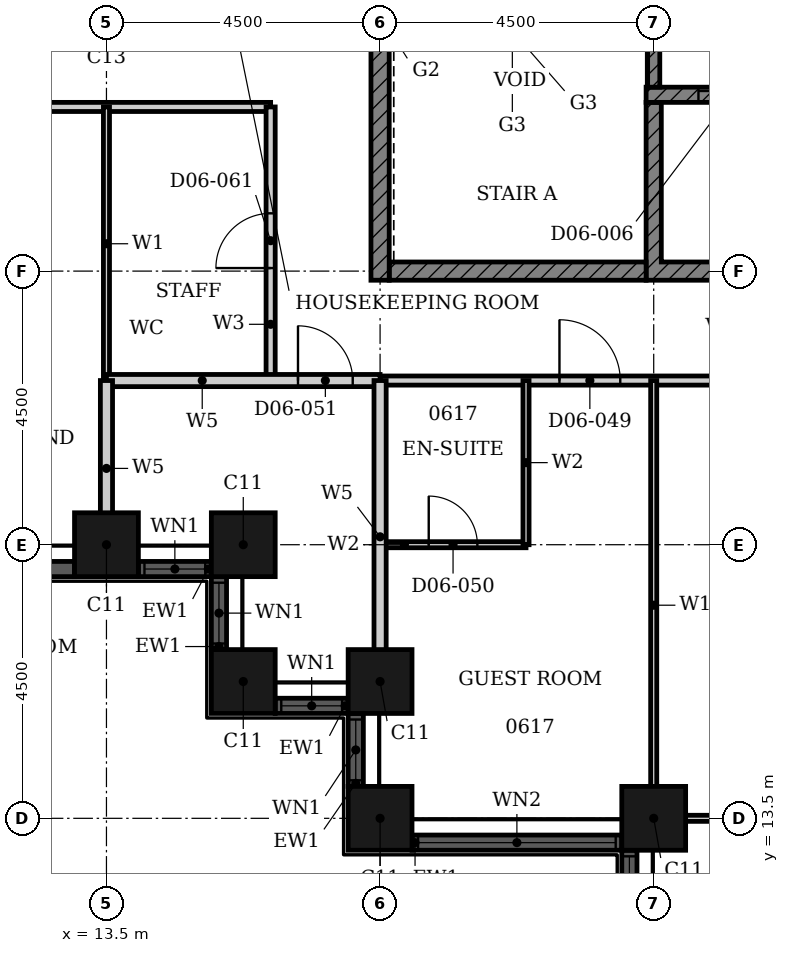
"""IFC4 building model, lengths in metres.
Left out: names, types, materials, properties, quantities, classifications, styles, units other than length and angle.
Written with IfcOpenShell. Run it as: python <this file> out.ifc"""

import sys

from ifc_helpers import new_model, si_unit, direction, frame, frame_2d, origin, origin_2d, place, context, subcontext, project, spatial, polyline, rectangle, hollow_rectangle, outline, extrude, element, fill, save


model = new_model("IFC4")
c1 = context("Model", 3, precision=1e-05, world=origin(), true_north=direction((0.0, 1.0)))
c2 = subcontext(c1, "Body", "Model", "MODEL_VIEW")
j1 = project(units=[si_unit("LENGTHUNIT", "METRE"), si_unit("PLANEANGLEUNIT", "RADIAN")], contexts=[c1])
p1 = place(None, origin())
s1 = spatial("IfcSite", under=j1, at=p1, CompositionType="ELEMENT")
p2 = place(p1, origin())
s2 = spatial("IfcBuilding", under=s1, at=p2, CompositionType="ELEMENT")
p3 = place(p2, frame((0.0, 0.0, 33.6)))
s3 = spatial("IfcBuildingStorey", under=s2, at=p3, CompositionType="ELEMENT", Elevation=33.6)
for number, where, z_axis, x_axis in (
    (1, (13.5, 18.0, 0.0), (0.0, 0.0, 1.0), (1.0, 0.0, 0.0)),
    (2, (15.75, 18.0, 0.0), (0.0, 0.0, 1.0), (1.0, 0.0, 0.0)),
    (3, (15.75, 15.75, 0.0), (0.0, 0.0, 1.0), (1.0, 0.0, 0.0)),
    (4, (18.0, 15.75, 0.0), (0.0, 0.0, 1.0), (1.0, 0.0, 0.0)),
    (5, (18.0, 13.5, 0.0), (0.0, 0.0, 1.0), (1.0, 0.0, 0.0)),
    (6, (22.5, 13.5, 0.0), (0.0, 0.0, 1.0), (1.0, 0.0, 0.0)),
):
    element("IfcColumn", number, at=place(p3, frame(where, z_axis=z_axis, x_axis=x_axis)), inside=s3, PredefinedType="COLUMN", context=c2, shape_type="SweptSolid", body=[
        extrude(hollow_rectangle(XDim=1.05, YDim=1.05, WallThickness=0.034, at=origin_2d()), origin(), (0.0, 0.0, 1.0), 3.6),
    ])
p4 = place(p3, frame((5.025, 17.6, 0.0), z_axis=(0.0, 0.0, 1.0), x_axis=(1.0, 0.0, 0.0)))
e7 = element("IfcWall", 7, at=p4, inside=s3, PredefinedType="SOLIDWALL", context=c2, shape_type="SweptSolid", body=[
    extrude(rectangle(XDim=7.95, YDim=0.25, at=frame_2d((3.975, 0.0))), origin(), (0.0, 0.0, 1.0), 3.6),
])
p5 = place(p4, frame((0.1, 0.0, 0.9)))
e8 = element("IfcOpeningElement", 8, at=p5, cuts=e7, PredefinedType="OPENING", context=c2, shape_type="SweptSolid", body=[
    extrude(rectangle(XDim=3.25, YDim=2.08, at=frame_2d((1.625, 1.04))), frame((0.0, 0.135, 0.0), z_axis=(0.0, -1.0, 0.0), x_axis=(1.0, 0.0, 0.0)), (0.0, 0.0, 1.0), 0.27),
])
p6 = place(p4, frame((5.325, 0.0, 0.0)))
e9 = element("IfcOpeningElement", 9, at=p6, cuts=e7, PredefinedType="OPENING", context=c2, shape_type="SweptSolid", body=[
    extrude(rectangle(XDim=1.8, YDim=2.4, at=frame_2d((0.9, 1.2))), frame((0.0, 0.135, 0.0), z_axis=(0.0, -1.0, 0.0), x_axis=(1.0, 0.0, 0.0)), (0.0, 0.0, 1.0), 0.27),
])
p7 = place(p3, frame((14.025, 17.6, 0.0), z_axis=(0.0, 0.0, 1.0), x_axis=(1.0, 0.0, 0.0)))
e10 = element("IfcWall", 10, at=p7, inside=s3, PredefinedType="SOLIDWALL", context=c2, shape_type="SweptSolid", body=[
    extrude(rectangle(XDim=1.2, YDim=0.25, at=frame_2d((0.6, 0.0))), origin(), (0.0, 0.0, 1.0), 3.6),
])
p8 = place(p7, frame((0.1, 0.0, 0.9)))
e11 = element("IfcOpeningElement", 11, at=p8, cuts=e10, PredefinedType="OPENING", context=c2, shape_type="SweptSolid", body=[
    extrude(rectangle(XDim=1.0, YDim=2.08, at=frame_2d((0.5, 1.04))), frame((0.0, 0.135, 0.0), z_axis=(0.0, -1.0, 0.0), x_axis=(1.0, 0.0, 0.0)), (0.0, 0.0, 1.0), 0.27),
])
p9 = place(p3, frame((15.35, 17.475, 0.0), z_axis=(0.0, 0.0, 1.0), x_axis=(0.0, -1.0, 0.0)))
e12 = element("IfcWall", 12, at=p9, inside=s3, PredefinedType="SOLIDWALL", context=c2, shape_type="SweptSolid", body=[
    extrude(rectangle(XDim=1.2, YDim=0.25, at=frame_2d((0.6, 0.0))), origin(), (0.0, 0.0, 1.0), 3.6),
])
p10 = place(p9, frame((0.1, 0.0, 0.9)))
e13 = element("IfcOpeningElement", 13, at=p10, cuts=e12, PredefinedType="OPENING", context=c2, shape_type="SweptSolid", body=[
    extrude(rectangle(XDim=1.0, YDim=2.08, at=frame_2d((0.5, 1.04))), frame((0.0, 0.135, 0.0), z_axis=(0.0, -1.0, 0.0), x_axis=(1.0, 0.0, 0.0)), (0.0, 0.0, 1.0), 0.27),
])
p11 = place(p3, frame((16.275, 15.35, 0.0), z_axis=(0.0, 0.0, 1.0), x_axis=(1.0, 0.0, 0.0)))
e14 = element("IfcWall", 14, at=p11, inside=s3, PredefinedType="SOLIDWALL", context=c2, shape_type="SweptSolid", body=[
    extrude(rectangle(XDim=1.2, YDim=0.25, at=frame_2d((0.6, 0.0))), origin(), (0.0, 0.0, 1.0), 3.6),
])
p12 = place(p11, frame((0.1, 0.0, 0.9)))
e15 = element("IfcOpeningElement", 15, at=p12, cuts=e14, PredefinedType="OPENING", context=c2, shape_type="SweptSolid", body=[
    extrude(rectangle(XDim=1.0, YDim=2.08, at=frame_2d((0.5, 1.04))), frame((0.0, 0.135, 0.0), z_axis=(0.0, -1.0, 0.0), x_axis=(1.0, 0.0, 0.0)), (0.0, 0.0, 1.0), 0.27),
])
p13 = place(p3, frame((17.6, 15.225, 0.0), z_axis=(0.0, 0.0, 1.0), x_axis=(0.0, -1.0, 0.0)))
e16 = element("IfcWall", 16, at=p13, inside=s3, PredefinedType="SOLIDWALL", context=c2, shape_type="SweptSolid", body=[
    extrude(rectangle(XDim=1.2, YDim=0.25, at=frame_2d((0.6, 0.0))), origin(), (0.0, 0.0, 1.0), 3.6),
])
p14 = place(p13, frame((0.1, 0.0, 0.9)))
e17 = element("IfcOpeningElement", 17, at=p14, cuts=e16, PredefinedType="OPENING", context=c2, shape_type="SweptSolid", body=[
    extrude(rectangle(XDim=1.0, YDim=2.08, at=frame_2d((0.5, 1.04))), frame((0.0, 0.135, 0.0), z_axis=(0.0, -1.0, 0.0), x_axis=(1.0, 0.0, 0.0)), (0.0, 0.0, 1.0), 0.27),
])
p15 = place(p3, frame((18.525, 13.1, 0.0), z_axis=(0.0, 0.0, 1.0), x_axis=(1.0, 0.0, 0.0)))
e18 = element("IfcWall", 18, at=p15, inside=s3, PredefinedType="SOLIDWALL", context=c2, shape_type="SweptSolid", body=[
    extrude(rectangle(XDim=3.45, YDim=0.25, at=frame_2d((1.725, 0.0))), origin(), (0.0, 0.0, 1.0), 3.6),
])
p16 = place(p15, frame((0.1, 0.0, 0.9)))
e19 = element("IfcOpeningElement", 19, at=p16, cuts=e18, PredefinedType="OPENING", context=c2, shape_type="SweptSolid", body=[
    extrude(rectangle(XDim=3.25, YDim=2.08, at=frame_2d((1.625, 1.04))), frame((0.0, 0.135, 0.0), z_axis=(0.0, -1.0, 0.0), x_axis=(1.0, 0.0, 0.0)), (0.0, 0.0, 1.0), 0.27),
])
p17 = place(p3, frame((22.1, 12.975, 0.0), z_axis=(0.0, 0.0, 1.0), x_axis=(0.0, -1.0, 0.0)))
e20 = element("IfcWall", 20, at=p17, inside=s3, PredefinedType="SOLIDWALL", context=c2, shape_type="SweptSolid", body=[
    extrude(rectangle(XDim=7.95, YDim=0.25, at=frame_2d((3.975, 0.0))), origin(), (0.0, 0.0, 1.0), 3.6),
])
p18 = place(p17, frame((0.1, 0.0, 0.9)))
e21 = element("IfcOpeningElement", 21, at=p18, cuts=e20, PredefinedType="OPENING", context=c2, shape_type="SweptSolid", body=[
    extrude(rectangle(XDim=3.25, YDim=2.08, at=frame_2d((1.625, 1.04))), frame((0.0, 0.135, 0.0), z_axis=(0.0, -1.0, 0.0), x_axis=(1.0, 0.0, 0.0)), (0.0, 0.0, 1.0), 0.27),
])
p19 = place(p17, frame((5.325, 0.0, 0.0)))
e22 = element("IfcOpeningElement", 22, at=p19, cuts=e20, PredefinedType="OPENING", context=c2, shape_type="SweptSolid", body=[
    extrude(rectangle(XDim=1.8, YDim=2.4, at=frame_2d((0.9, 1.2))), frame((0.0, 0.135, 0.0), z_axis=(0.0, -1.0, 0.0), x_axis=(1.0, 0.0, 0.0)), (0.0, 0.0, 1.0), 0.27),
])
p20 = place(p3, origin())
e23 = element("IfcWall", 23, at=p20, inside=s3, PredefinedType="SHEAR", context=c2, shape_type="SweptSolid", body=[
    extrude(outline(polyline([(22.375, 22.35), (38.053, 22.35), (38.053, 25.275), (37.803, 25.275), (37.803, 22.65), (35.482, 22.65), (35.482, 25.275), (35.232, 25.275), (35.232, 22.65), (32.911, 22.65), (32.911, 25.275), (32.661, 25.275), (32.661, 22.65), (30.339, 22.65), (30.339, 25.275), (30.089, 25.275), (30.089, 22.65), (27.768, 22.65), (27.768, 25.275), (27.518, 25.275), (27.518, 22.65), (25.197, 22.65), (25.197, 25.275), (24.947, 25.275), (24.947, 22.65), (22.625, 22.65), (22.625, 25.275), (22.375, 25.275), (22.375, 22.35)])), origin(), (0.0, 0.0, 1.0), 3.3),
])
p21 = place(p3, frame((18.15, 22.5, 0.0), z_axis=(0.0, 0.0, 1.0), x_axis=(1.0, 0.0, 0.0)))
e24 = element("IfcWall", 24, at=p21, inside=s3, PredefinedType="SHEAR", context=c2, shape_type="SweptSolid", body=[
    extrude(rectangle(XDim=4.225, YDim=0.3, at=frame_2d((2.113, 0.0))), origin(), (0.0, 0.0, 1.0), 3.3),
])
p22 = place(p3, frame((18.0, 22.35, 0.0), z_axis=(0.0, 0.0, 1.0), x_axis=(0.0, 1.0, 0.0)))
e25 = element("IfcWall", 25, at=p22, inside=s3, PredefinedType="SHEAR", context=c2, shape_type="SweptSolid", body=[
    extrude(rectangle(XDim=9.3, YDim=0.3, at=frame_2d((4.65, 0.0))), origin(), (0.0, 0.0, 1.0), 3.3),
])
p23 = place(p3, frame((22.375, 25.4, 0.0), z_axis=(0.0, 0.0, 1.0), x_axis=(1.0, 0.0, 0.0)))
e26 = element("IfcWall", 26, at=p23, inside=s3, PredefinedType="SHEAR", context=c2, shape_type="SweptSolid", body=[
    extrude(rectangle(XDim=15.678, YDim=0.25, at=frame_2d((7.839, 0.0))), origin(), (0.0, 0.0, 1.0), 3.3),
])
p24 = place(p23, frame((3.432, 0.0, 0.0)))
e27 = element("IfcOpeningElement", 27, at=p24, cuts=e26, PredefinedType="OPENING", context=c2, shape_type="SweptSolid", body=[
    extrude(rectangle(XDim=1.1, YDim=2.1, at=frame_2d((0.55, 1.05))), frame((0.0, 0.135, 0.0), z_axis=(0.0, -1.0, 0.0), x_axis=(1.0, 0.0, 0.0)), (0.0, 0.0, 1.0), 0.27),
])
p25 = place(p23, frame((11.146, 0.0, 0.0)))
e28 = element("IfcOpeningElement", 28, at=p25, cuts=e26, PredefinedType="OPENING", context=c2, shape_type="SweptSolid", body=[
    extrude(rectangle(XDim=1.1, YDim=2.1, at=frame_2d((0.55, 1.05))), frame((0.0, 0.135, 0.0), z_axis=(0.0, -1.0, 0.0), x_axis=(1.0, 0.0, 0.0)), (0.0, 0.0, 1.0), 0.27),
])
p26 = place(p23, frame((13.718, 0.0, 0.0)))
e29 = element("IfcOpeningElement", 29, at=p26, cuts=e26, PredefinedType="OPENING", context=c2, shape_type="SweptSolid", body=[
    extrude(rectangle(XDim=1.1, YDim=2.1, at=frame_2d((0.55, 1.05))), frame((0.0, 0.135, 0.0), z_axis=(0.0, -1.0, 0.0), x_axis=(1.0, 0.0, 0.0)), (0.0, 0.0, 1.0), 0.27),
])
p27 = place(p23, frame((0.861, 0.0, 0.0)))
e30 = element("IfcOpeningElement", 30, at=p27, cuts=e26, PredefinedType="OPENING", context=c2, shape_type="SweptSolid", body=[
    extrude(rectangle(XDim=1.1, YDim=2.1, at=frame_2d((0.55, 1.05))), frame((0.0, 0.135, 0.0), z_axis=(0.0, -1.0, 0.0), x_axis=(1.0, 0.0, 0.0)), (0.0, 0.0, 1.0), 0.27),
])
p28 = place(p3, frame((22.5, 31.35, 0.0), z_axis=(0.0, 0.0, 1.0), x_axis=(0.0, -1.0, 0.0)))
e31 = element("IfcWall", 31, at=p28, inside=s3, PredefinedType="SHEAR", context=c2, shape_type="SweptSolid", body=[
    extrude(rectangle(XDim=5.825, YDim=0.2, at=frame_2d((2.913, 0.0))), origin(), (0.0, 0.0, 1.0), 3.3),
])
p29 = place(p28, frame((0.25, 0.0, 0.0)))
e32 = element("IfcOpeningElement", 32, at=p29, cuts=e31, PredefinedType="OPENING", context=c2, shape_type="SweptSolid", body=[
    extrude(rectangle(XDim=1.8, YDim=2.1, at=frame_2d((0.9, 1.05))), frame((0.0, 0.11, 0.0), z_axis=(0.0, -1.0, 0.0), x_axis=(1.0, 0.0, 0.0)), (0.0, 0.0, 1.0), 0.22),
])
p30 = place(p3, frame((18.0, 20.7, 0.0), z_axis=(0.0, 0.0, 1.0), x_axis=(1.0, 0.0, 0.0)))
e33 = element("IfcWall", 33, at=p30, inside=s3, PredefinedType="PARTITIONING", context=c2, shape_type="SweptSolid", body=[
    extrude(rectangle(XDim=11.7, YDim=0.15, at=frame_2d((5.85, 0.0))), origin(), (0.0, 0.0, 1.0), 3.3),
])
p31 = place(p30, frame((2.95, 0.0, 0.0)))
e34 = element("IfcOpeningElement", 34, at=p31, cuts=e33, PredefinedType="OPENING", context=c2, shape_type="SweptSolid", body=[
    extrude(rectangle(XDim=1.0, YDim=2.1, at=frame_2d((0.5, 1.05))), frame((0.0, 0.085, 0.0), z_axis=(0.0, -1.0, 0.0), x_axis=(1.0, 0.0, 0.0)), (0.0, 0.0, 1.0), 0.17),
])
p32 = place(p30, frame((7.65, 0.0, 0.0)))
e35 = element("IfcOpeningElement", 35, at=p32, cuts=e33, PredefinedType="OPENING", context=c2, shape_type="SweptSolid", body=[
    extrude(rectangle(XDim=0.9, YDim=2.1, at=frame_2d((0.45, 1.05))), frame((0.0, 0.085, 0.0), z_axis=(0.0, -1.0, 0.0), x_axis=(1.0, 0.0, 0.0)), (0.0, 0.0, 1.0), 0.17),
])
p33 = place(p3, frame((4.5, 25.2, 0.0), z_axis=(0.0, 0.0, 1.0), x_axis=(1.0, 0.0, 0.0)))
e36 = element("IfcWall", 36, at=p33, inside=s3, PredefinedType="PARTITIONING", context=c2, shape_type="SweptSolid", body=[
    extrude(rectangle(XDim=11.7, YDim=0.15, at=frame_2d((5.85, 0.0))), origin(), (0.0, 0.0, 1.0), 3.3),
])
p34 = place(p33, frame((6.25, 0.0, 0.0)))
e37 = element("IfcOpeningElement", 37, at=p34, cuts=e36, PredefinedType="OPENING", context=c2, shape_type="SweptSolid", body=[
    extrude(rectangle(XDim=1.0, YDim=2.1, at=frame_2d((0.5, 1.05))), frame((0.0, 0.085, 0.0), z_axis=(0.0, -1.0, 0.0), x_axis=(1.0, 0.0, 0.0)), (0.0, 0.0, 1.0), 0.17),
])
p35 = place(p3, frame((16.2, 20.7, 0.0), z_axis=(0.0, 0.0, 1.0), x_axis=(0.0, 1.0, 0.0)))
e38 = element("IfcWall", 38, at=p35, inside=s3, PredefinedType="PARTITIONING", context=c2, shape_type="SweptSolid", body=[
    extrude(rectangle(XDim=4.5, YDim=0.15, at=frame_2d((2.25, 0.0))), origin(), (0.0, 0.0, 1.0), 3.3),
])
p36 = place(p35, frame((1.85, 0.0, 0.0)))
e39 = element("IfcOpeningElement", 39, at=p36, cuts=e38, PredefinedType="OPENING", context=c2, shape_type="SweptSolid", body=[
    extrude(rectangle(XDim=0.9, YDim=2.1, at=frame_2d((0.45, 1.05))), frame((0.0, 0.085, 0.0), z_axis=(0.0, -1.0, 0.0), x_axis=(1.0, 0.0, 0.0)), (0.0, 0.0, 1.0), 0.17),
])
p37 = place(p3, frame((22.31, 13.5, 0.0), z_axis=(0.0, 0.0, 1.0), x_axis=(1.0, 0.0, 0.0)))
e40 = element("IfcWall", 40, at=p37, inside=s3, PredefinedType="PARTITIONING", context=c2, shape_type="SweptSolid", body=[
    extrude(rectangle(XDim=7.39, YDim=0.1, at=frame_2d((3.695, 0.0))), origin(), (0.0, 0.0, 1.0), 2.38),
])
p38 = place(p3, frame((13.5, 20.7, 0.0), z_axis=(0.0, 0.0, 1.0), x_axis=(0.0, 1.0, 0.0)))
e41 = element("IfcWall", 41, at=p38, inside=s3, PredefinedType="PARTITIONING", context=c2, shape_type="SweptSolid", body=[
    extrude(rectangle(XDim=4.5, YDim=0.1, at=frame_2d((2.25, 0.0))), origin(), (0.0, 0.0, 1.0), 2.38),
])
p39 = place(p3, frame((22.5, 13.31, 0.0), z_axis=(0.0, 0.0, 1.0), x_axis=(0.0, 1.0, 0.0)))
e42 = element("IfcWall", 42, at=p39, inside=s3, PredefinedType="PARTITIONING", context=c2, shape_type="SweptSolid", body=[
    extrude(rectangle(XDim=7.39, YDim=0.1, at=frame_2d((3.695, 0.0))), origin(), (0.0, 0.0, 1.0), 3.3),
])
p40 = place(p3, frame((18.0, 18.0, 0.0), z_axis=(0.0, 0.0, 1.0), x_axis=(1.0, 0.0, 0.0)))
e43 = element("IfcWall", 43, at=p40, inside=s3, PredefinedType="PARTITIONING", context=c2, shape_type="SweptSolid", body=[
    extrude(rectangle(XDim=2.4, YDim=0.1, at=frame_2d((1.2, 0.0))), origin(), (0.0, 0.0, 1.0), 3.3),
])
p41 = place(p40, frame((0.8, 0.0, 0.0)))
e44 = element("IfcOpeningElement", 44, at=p41, cuts=e43, PredefinedType="OPENING", context=c2, shape_type="SweptSolid", body=[
    extrude(rectangle(XDim=0.8, YDim=2.1, at=frame_2d((0.4, 1.05))), frame((0.0, 0.06, 0.0), z_axis=(0.0, -1.0, 0.0), x_axis=(1.0, 0.0, 0.0)), (0.0, 0.0, 1.0), 0.12),
])
p42 = place(p3, frame((20.4, 18.0, 0.0), z_axis=(0.0, 0.0, 1.0), x_axis=(0.0, 1.0, 0.0)))
e45 = element("IfcWall", 45, at=p42, inside=s3, PredefinedType="PARTITIONING", context=c2, shape_type="SweptSolid", body=[
    extrude(rectangle(XDim=2.7, YDim=0.1, at=frame_2d((1.35, 0.0))), origin(), (0.0, 0.0, 1.0), 3.3),
])
p43 = place(p3, frame((13.5, 20.7, 0.0), z_axis=(0.0, 0.0, 1.0), x_axis=(1.0, 0.0, 0.0)))
e46 = element("IfcWall", 46, at=p43, inside=s3, PredefinedType="PARTITIONING", context=c2, shape_type="SweptSolid", body=[
    extrude(rectangle(XDim=4.5, YDim=0.2, at=frame_2d((2.25, 0.0))), origin(), (0.0, 0.0, 1.0), 3.3),
])
p44 = place(p43, frame((3.15, 0.0, 0.0)))
e47 = element("IfcOpeningElement", 47, at=p44, cuts=e46, PredefinedType="OPENING", context=c2, shape_type="SweptSolid", body=[
    extrude(rectangle(XDim=0.9, YDim=2.1, at=frame_2d((0.45, 1.05))), frame((0.0, 0.11, 0.0), z_axis=(0.0, -1.0, 0.0), x_axis=(1.0, 0.0, 0.0)), (0.0, 0.0, 1.0), 0.22),
])
p45 = place(p3, frame((13.5, 17.81, 0.0), z_axis=(0.0, 0.0, 1.0), x_axis=(0.0, 1.0, 0.0)))
e48 = element("IfcWall", 48, at=p45, inside=s3, PredefinedType="PARTITIONING", context=c2, shape_type="SweptSolid", body=[
    extrude(rectangle(XDim=2.89, YDim=0.2, at=frame_2d((1.445, 0.0))), origin(), (0.0, 0.0, 1.0), 2.38),
])
p46 = place(p3, frame((18.0, 15.56, 0.0), z_axis=(0.0, 0.0, 1.0), x_axis=(0.0, 1.0, 0.0)))
e49 = element("IfcWall", 49, at=p46, inside=s3, PredefinedType="PARTITIONING", context=c2, shape_type="SweptSolid", body=[
    extrude(rectangle(XDim=5.14, YDim=0.2, at=frame_2d((2.57, 0.0))), origin(), (0.0, 0.0, 1.0), 3.3),
])
p47 = place(p8, origin())
e50 = element("IfcWindow", 50, at=p47, inside=s3, PartitioningType="SINGLE_PANEL", PredefinedType="WINDOW", context=c2, shape_type="SweptSolid", body=[
    extrude(rectangle(XDim=1.0, YDim=2.08, at=frame_2d((0.5, 1.04))), frame((0.0, 0.03, 0.0), z_axis=(0.0, -1.0, 0.0), x_axis=(1.0, 0.0, 0.0)), (0.0, 0.0, 1.0), 0.06),
])
fill(e11, e50)
p48 = place(p10, origin())
e51 = element("IfcWindow", 51, at=p48, inside=s3, PartitioningType="SINGLE_PANEL", PredefinedType="WINDOW", context=c2, shape_type="SweptSolid", body=[
    extrude(rectangle(XDim=1.0, YDim=2.08, at=frame_2d((0.5, 1.04))), frame((0.0, 0.03, 0.0), z_axis=(0.0, -1.0, 0.0), x_axis=(1.0, 0.0, 0.0)), (0.0, 0.0, 1.0), 0.06),
])
fill(e13, e51)
p49 = place(p12, origin())
e52 = element("IfcWindow", 52, at=p49, inside=s3, PartitioningType="SINGLE_PANEL", PredefinedType="WINDOW", context=c2, shape_type="SweptSolid", body=[
    extrude(rectangle(XDim=1.0, YDim=2.08, at=frame_2d((0.5, 1.04))), frame((0.0, 0.03, 0.0), z_axis=(0.0, -1.0, 0.0), x_axis=(1.0, 0.0, 0.0)), (0.0, 0.0, 1.0), 0.06),
])
fill(e15, e52)
p50 = place(p14, origin())
e53 = element("IfcWindow", 53, at=p50, inside=s3, PartitioningType="SINGLE_PANEL", PredefinedType="WINDOW", context=c2, shape_type="SweptSolid", body=[
    extrude(rectangle(XDim=1.0, YDim=2.08, at=frame_2d((0.5, 1.04))), frame((0.0, 0.03, 0.0), z_axis=(0.0, -1.0, 0.0), x_axis=(1.0, 0.0, 0.0)), (0.0, 0.0, 1.0), 0.06),
])
fill(e17, e53)
p51 = place(p16, origin())
e54 = element("IfcWindow", 54, at=p51, inside=s3, PartitioningType="SINGLE_PANEL", PredefinedType="WINDOW", context=c2, shape_type="SweptSolid", body=[
    extrude(rectangle(XDim=3.25, YDim=2.08, at=frame_2d((1.625, 1.04))), frame((0.0, 0.03, 0.0), z_axis=(0.0, -1.0, 0.0), x_axis=(1.0, 0.0, 0.0)), (0.0, 0.0, 1.0), 0.06),
])
fill(e19, e54)
p52 = place(p18, origin())
e55 = element("IfcWindow", 55, at=p52, inside=s3, PartitioningType="SINGLE_PANEL", PredefinedType="WINDOW", context=c2, shape_type="SweptSolid", body=[
    extrude(rectangle(XDim=3.25, YDim=2.08, at=frame_2d((1.625, 1.04))), frame((0.0, 0.03, 0.0), z_axis=(0.0, -1.0, 0.0), x_axis=(1.0, 0.0, 0.0)), (0.0, 0.0, 1.0), 0.06),
])
fill(e21, e55)
p53 = place(p27, origin())
e56 = element("IfcDoor", 56, at=p53, inside=s3, OperationType="DOUBLE_DOOR_SLIDING", PredefinedType="DOOR", context=c2, shape_type="SweptSolid", body=[
    extrude(rectangle(XDim=1.1, YDim=2.1, at=frame_2d((0.55, 1.05))), frame((0.0, 0.025, 0.0), z_axis=(0.0, -1.0, 0.0), x_axis=(1.0, 0.0, 0.0)), (0.0, 0.0, 1.0), 0.05),
])
fill(e30, e56)
p54 = place(p31, origin())
e57 = element("IfcDoor", 57, at=p54, inside=s3, OperationType="SINGLE_SWING_RIGHT", PredefinedType="DOOR", context=c2, shape_type="SweptSolid", body=[
    extrude(rectangle(XDim=1.0, YDim=2.1, at=frame_2d((0.5, 1.05))), frame((0.0, 0.025, 0.0), z_axis=(0.0, -1.0, 0.0), x_axis=(1.0, 0.0, 0.0)), (0.0, 0.0, 1.0), 0.05),
])
fill(e34, e57)
p55 = place(p41, origin())
e58 = element("IfcDoor", 58, at=p55, inside=s3, OperationType="SINGLE_SWING_RIGHT", PredefinedType="DOOR", context=c2, shape_type="SweptSolid", body=[
    extrude(rectangle(XDim=0.8, YDim=2.1, at=frame_2d((0.4, 1.05))), frame((0.0, 0.025, 0.0), z_axis=(0.0, -1.0, 0.0), x_axis=(1.0, 0.0, 0.0)), (0.0, 0.0, 1.0), 0.05),
])
fill(e44, e58)
p56 = place(p44, origin())
e59 = element("IfcDoor", 59, at=p56, inside=s3, OperationType="SINGLE_SWING_RIGHT", PredefinedType="DOOR", context=c2, shape_type="SweptSolid", body=[
    extrude(rectangle(XDim=0.9, YDim=2.1, at=frame_2d((0.45, 1.05))), frame((0.0, 0.025, 0.0), z_axis=(0.0, -1.0, 0.0), x_axis=(1.0, 0.0, 0.0)), (0.0, 0.0, 1.0), 0.05),
])
fill(e47, e59)
p57 = place(p36, origin())
e60 = element("IfcDoor", 60, at=p57, inside=s3, OperationType="SINGLE_SWING_LEFT", PredefinedType="DOOR", context=c2, shape_type="SweptSolid", body=[
    extrude(rectangle(XDim=0.9, YDim=2.1, at=frame_2d((0.45, 1.05))), frame((0.0, 0.025, 0.0), z_axis=(0.0, -1.0, 0.0), x_axis=(1.0, 0.0, 0.0)), (0.0, 0.0, 1.0), 0.05),
])
fill(e39, e60)
save(model, sys.argv[1])
